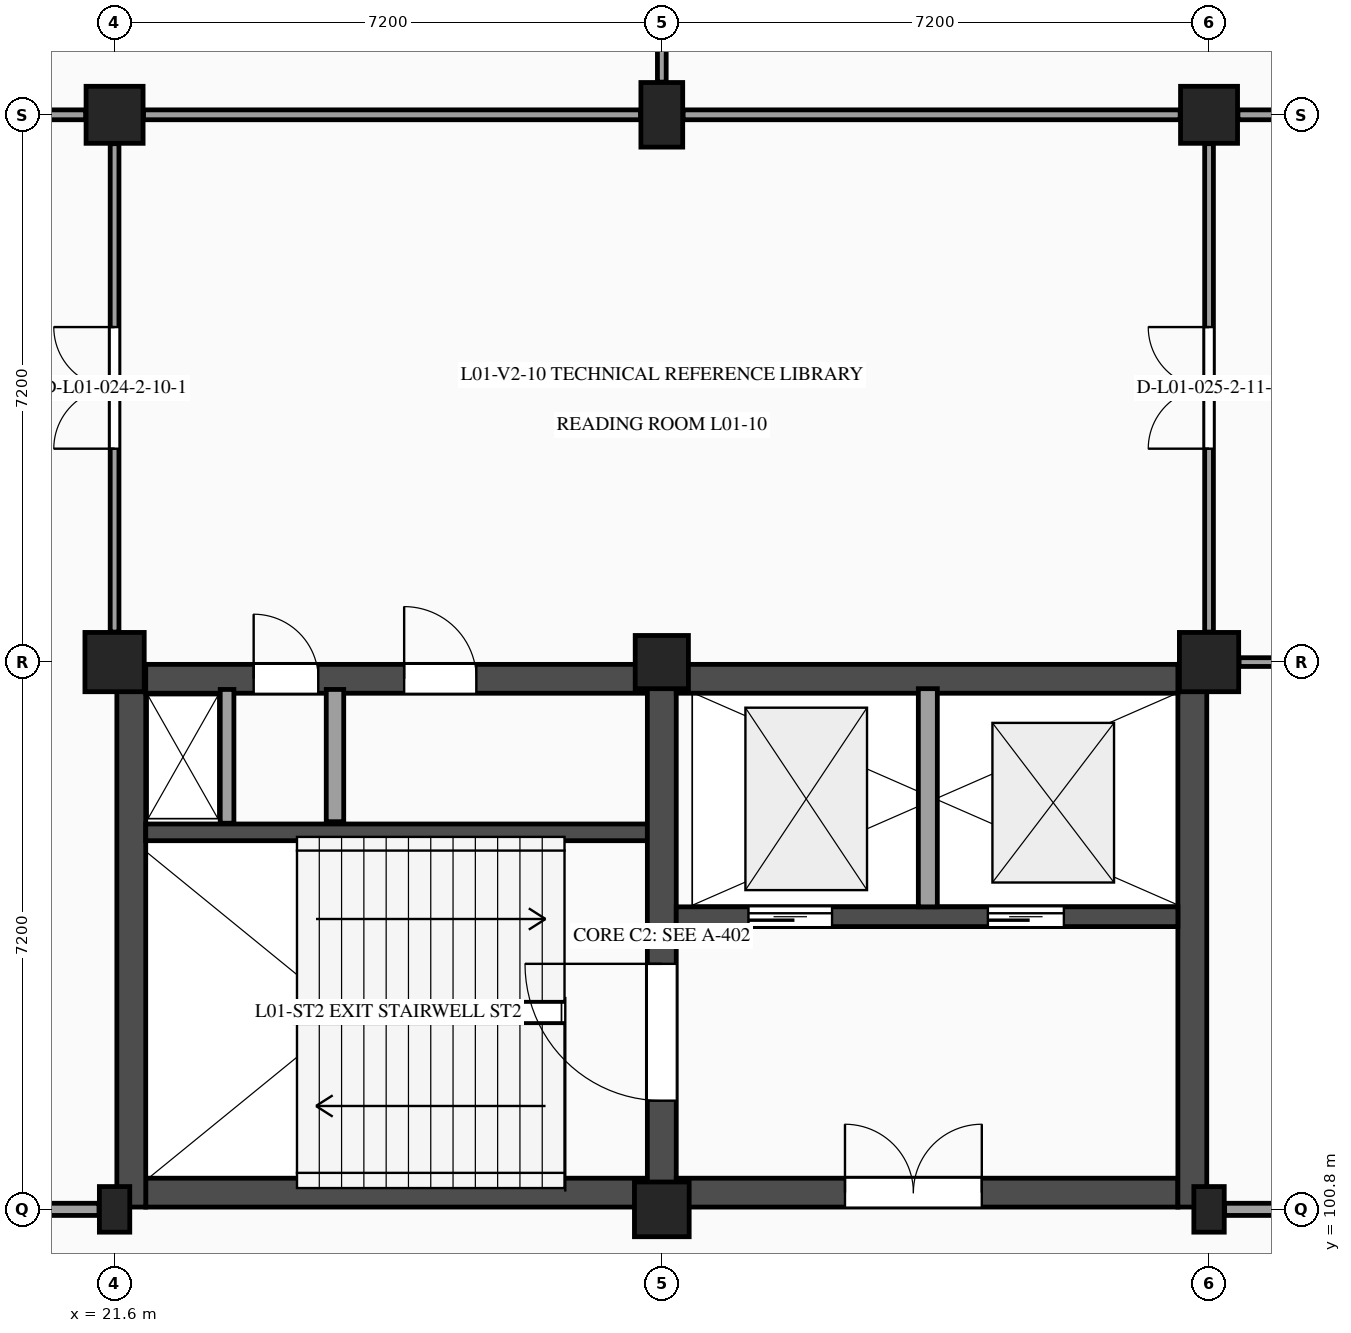
"""IFC4 building model, lengths in metres.
Left out: names, types, materials, properties, quantities, classifications, styles, units other than length and angle.
Written with IfcOpenShell. Run it as: python <this file> out.ifc"""

import sys

from ifc_helpers import new_model, si_unit, direction, frame, frame_2d, origin, origin_2d, place, context, subcontext, project, spatial, rectangle, extrude, element, fill, save


model = new_model("IFC4")
c1 = context("Model", 3, precision=1e-05, world=origin(), true_north=direction((0.0, 1.0)))
c2 = subcontext(c1, "Body", "Model", "MODEL_VIEW")
j1 = project(units=[si_unit("LENGTHUNIT", "METRE"), si_unit("PLANEANGLEUNIT", "RADIAN")], contexts=[c1])
p1 = place(None, origin())
s1 = spatial("IfcSite", under=j1, at=p1, CompositionType="ELEMENT")
p2 = place(p1, origin())
s2 = spatial("IfcBuilding", under=s1, at=p2, CompositionType="ELEMENT")
p3 = place(p2, frame((0.0, 0.0, 5.4)))
s3 = spatial("IfcBuildingStorey", under=s2, at=p3, CompositionType="ELEMENT", Elevation=5.4)
p4 = place(p3, frame((21.6, 100.8, 0.0), z_axis=(0.0, 0.0, 1.0), x_axis=(1.0, 0.0, 0.0)))
e1 = element("IfcColumn", 1, at=p4, inside=s3, PredefinedType="PILASTER", context=c2, shape_type="SweptSolid", body=[
    extrude(rectangle(XDim=0.4, YDim=0.6, at=origin_2d()), origin(), (0.0, 0.0, 1.0), 4.5),
])
p5 = place(p3, frame((21.6, 108.0, 0.0), z_axis=(0.0, 0.0, 1.0), x_axis=(1.0, 0.0, 0.0)))
e2 = element("IfcColumn", 2, at=p5, inside=s3, PredefinedType="COLUMN", context=c2, shape_type="SweptSolid", body=[
    extrude(rectangle(XDim=0.78, YDim=0.78, at=origin_2d()), origin(), (0.0, 0.0, 1.0), 4.5),
])
p6 = place(p3, frame((21.6, 115.2, 0.0), z_axis=(0.0, 0.0, 1.0), x_axis=(1.0, 0.0, 0.0)))
e3 = element("IfcColumn", 3, at=p6, inside=s3, PredefinedType="COLUMN", context=c2, shape_type="SweptSolid", body=[
    extrude(rectangle(XDim=0.75, YDim=0.75, at=origin_2d()), origin(), (0.0, 0.0, 1.0), 4.5),
])
p7 = place(p3, frame((28.8, 100.8, 0.0), z_axis=(0.0, 0.0, 1.0), x_axis=(1.0, 0.0, 0.0)))
e4 = element("IfcColumn", 4, at=p7, inside=s3, PredefinedType="COLUMN", context=c2, shape_type="SweptSolid", body=[
    extrude(rectangle(XDim=0.72, YDim=0.72, at=origin_2d()), origin(), (0.0, 0.0, 1.0), 4.5),
])
p8 = place(p3, frame((28.8, 108.0, 0.0), z_axis=(0.0, 0.0, 1.0), x_axis=(1.0, 0.0, 0.0)))
e5 = element("IfcColumn", 5, at=p8, inside=s3, PredefinedType="COLUMN", context=c2, shape_type="SweptSolid", body=[
    extrude(rectangle(XDim=0.7, YDim=0.7, at=origin_2d()), origin(), (0.0, 0.0, 1.0), 4.5),
])
p9 = place(p3, frame((28.8, 115.2, 0.0), z_axis=(0.0, 0.0, 1.0), x_axis=(1.0, 0.0, 0.0)))
e6 = element("IfcColumn", 6, at=p9, inside=s3, PredefinedType="COLUMN", context=c2, shape_type="SweptSolid", body=[
    extrude(rectangle(XDim=0.55, YDim=0.85, at=origin_2d()), origin(), (0.0, 0.0, 1.0), 4.5),
])
p10 = place(p3, frame((36.0, 100.8, 0.0), z_axis=(0.0, 0.0, 1.0), x_axis=(1.0, 0.0, 0.0)))
e7 = element("IfcColumn", 7, at=p10, inside=s3, PredefinedType="PILASTER", context=c2, shape_type="SweptSolid", body=[
    extrude(rectangle(XDim=0.4, YDim=0.6, at=origin_2d()), origin(), (0.0, 0.0, 1.0), 4.5),
])
p11 = place(p3, frame((36.0, 108.0, 0.0), z_axis=(0.0, 0.0, 1.0), x_axis=(1.0, 0.0, 0.0)))
e8 = element("IfcColumn", 8, at=p11, inside=s3, PredefinedType="COLUMN", context=c2, shape_type="SweptSolid", body=[
    extrude(rectangle(XDim=0.78, YDim=0.78, at=origin_2d()), origin(), (0.0, 0.0, 1.0), 4.5),
])
p12 = place(p3, frame((36.0, 115.2, 0.0), z_axis=(0.0, 0.0, 1.0), x_axis=(1.0, 0.0, 0.0)))
e9 = element("IfcColumn", 9, at=p12, inside=s3, PredefinedType="COLUMN", context=c2, shape_type="SweptSolid", body=[
    extrude(rectangle(XDim=0.75, YDim=0.75, at=origin_2d()), origin(), (0.0, 0.0, 1.0), 4.5),
])
p13 = place(p3, frame((22.01, 101.02, 0.0), z_axis=(0.0, 0.0, 1.0), x_axis=(1.0, 0.0, 0.0)))
e10 = element("IfcWall", 10, at=p13, inside=s3, PredefinedType="SHEAR", context=c2, shape_type="SweptSolid", body=[
    extrude(rectangle(XDim=6.6, YDim=0.38, at=frame_2d((3.3, 0.0))), origin(), (0.0, 0.0, 1.0), 4.21),
])
p14 = place(p3, frame((21.82, 107.97, 0.0), z_axis=(0.0, 0.0, 1.0), x_axis=(0.0, -1.0, 0.0)))
e11 = element("IfcWall", 11, at=p14, inside=s3, PredefinedType="SHEAR", context=c2, shape_type="SweptSolid", body=[
    extrude(rectangle(XDim=7.14, YDim=0.38, at=frame_2d((3.57, 0.0))), origin(), (0.0, 0.0, 1.0), 4.21),
])
p15 = place(p3, frame((22.01, 107.78, 0.0), z_axis=(0.0, 0.0, 1.0), x_axis=(1.0, 0.0, 0.0)))
e12 = element("IfcWall", 12, at=p15, inside=s3, PredefinedType="SHEAR", context=c2, shape_type="SweptSolid", body=[
    extrude(rectangle(XDim=6.6, YDim=0.38, at=frame_2d((3.3, 0.0))), origin(), (0.0, 0.0, 1.0), 4.21),
])
p16 = place(p15, frame((1.42, 0.0, 0.0)))
e13 = element("IfcOpeningElement", 13, at=p16, cuts=e12, PredefinedType="OPENING", context=c2, shape_type="SweptSolid", body=[
    extrude(rectangle(XDim=0.85, YDim=2.1, at=frame_2d((0.425, 1.05))), frame((0.0, 0.2, 0.0), z_axis=(0.0, -1.0, 0.0), x_axis=(1.0, 0.0, 0.0)), (0.0, 0.0, 1.0), 0.4),
])
p17 = place(p15, frame((3.4, 0.0, 0.0)))
e14 = element("IfcOpeningElement", 14, at=p17, cuts=e12, PredefinedType="OPENING", context=c2, shape_type="SweptSolid", body=[
    extrude(rectangle(XDim=0.95, YDim=2.15, at=frame_2d((0.475, 1.075))), frame((0.0, 0.2, 0.0), z_axis=(0.0, -1.0, 0.0), x_axis=(1.0, 0.0, 0.0)), (0.0, 0.0, 1.0), 0.4),
])
p18 = place(p3, frame((22.01, 105.76, 0.0), z_axis=(0.0, 0.0, 1.0), x_axis=(1.0, 0.0, 0.0)))
e15 = element("IfcWall", 15, at=p18, inside=s3, PredefinedType="SHEAR", context=c2, shape_type="SweptSolid", body=[
    extrude(rectangle(XDim=6.6, YDim=0.22, at=frame_2d((3.3, 0.0))), origin(), (0.0, 0.0, 1.0), 4.21),
])
p19 = place(p3, frame((24.5, 105.9, 0.0), z_axis=(0.0, 0.0, 1.0), x_axis=(0.0, 1.0, 0.0)))
e16 = element("IfcWall", 16, at=p19, inside=s3, PredefinedType="PARTITIONING", context=c2, shape_type="SweptSolid", body=[
    extrude(rectangle(XDim=1.74, YDim=0.23, at=frame_2d((0.87, 0.0))), origin(), (0.0, 0.0, 1.0), 4.21),
])
p20 = place(p3, frame((23.08, 105.88, 0.0), z_axis=(0.0, 0.0, 1.0), x_axis=(0.0, 1.0, 0.0)))
e17 = element("IfcWall", 17, at=p20, inside=s3, PredefinedType="PARTITIONING", context=c2, shape_type="SweptSolid", body=[
    extrude(rectangle(XDim=1.76, YDim=0.18, at=frame_2d((0.88, 0.0))), origin(), (0.0, 0.0, 1.0), 4.21),
])
p21 = place(p3, frame((28.8, 100.83, 0.0), z_axis=(0.0, 0.0, 1.0), x_axis=(0.0, 1.0, 0.0)))
e18 = element("IfcWall", 18, at=p21, inside=s3, PredefinedType="SHEAR", context=c2, shape_type="SweptSolid", body=[
    extrude(rectangle(XDim=7.14, YDim=0.38, at=frame_2d((3.57, 0.0))), origin(), (0.0, 0.0, 1.0), 4.21),
])
p22 = place(p21, frame((1.4, 0.0, 0.0)))
e19 = element("IfcOpeningElement", 19, at=p22, cuts=e18, PredefinedType="OPENING", context=c2, shape_type="SweptSolid", body=[
    extrude(rectangle(XDim=1.8, YDim=2.2, at=frame_2d((0.9, 1.1))), frame((0.0, 0.2, 0.0), z_axis=(0.0, -1.0, 0.0), x_axis=(1.0, 0.0, 0.0)), (0.0, 0.0, 1.0), 0.4),
])
p23 = place(p3, frame((28.99, 101.02, 0.0), z_axis=(0.0, 0.0, 1.0), x_axis=(1.0, 0.0, 0.0)))
e20 = element("IfcWall", 20, at=p23, inside=s3, PredefinedType="SHEAR", context=c2, shape_type="SweptSolid", body=[
    extrude(rectangle(XDim=6.6, YDim=0.38, at=frame_2d((3.3, 0.0))), origin(), (0.0, 0.0, 1.0), 4.21),
])
p24 = place(p23, frame((2.22, 0.0, 0.0)))
e21 = element("IfcOpeningElement", 21, at=p24, cuts=e20, PredefinedType="OPENING", context=c2, shape_type="SweptSolid", body=[
    extrude(rectangle(XDim=1.8, YDim=2.2, at=frame_2d((0.9, 1.1))), frame((0.0, 0.2, 0.0), z_axis=(0.0, -1.0, 0.0), x_axis=(1.0, 0.0, 0.0)), (0.0, 0.0, 1.0), 0.4),
])
p25 = place(p3, frame((35.78, 100.83, 0.0), z_axis=(0.0, 0.0, 1.0), x_axis=(0.0, 1.0, 0.0)))
e22 = element("IfcWall", 22, at=p25, inside=s3, PredefinedType="SHEAR", context=c2, shape_type="SweptSolid", body=[
    extrude(rectangle(XDim=7.14, YDim=0.38, at=frame_2d((3.57, 0.0))), origin(), (0.0, 0.0, 1.0), 4.21),
])
p26 = place(p3, frame((28.99, 107.78, 0.0), z_axis=(0.0, 0.0, 1.0), x_axis=(1.0, 0.0, 0.0)))
e23 = element("IfcWall", 23, at=p26, inside=s3, PredefinedType="SHEAR", context=c2, shape_type="SweptSolid", body=[
    extrude(rectangle(XDim=6.6, YDim=0.38, at=frame_2d((3.3, 0.0))), origin(), (0.0, 0.0, 1.0), 4.21),
])
p27 = place(p3, frame((28.99, 104.65, 0.0), z_axis=(0.0, 0.0, 1.0), x_axis=(1.0, 0.0, 0.0)))
e24 = element("IfcWall", 24, at=p27, inside=s3, PredefinedType="SHEAR", context=c2, shape_type="SweptSolid", body=[
    extrude(rectangle(XDim=6.6, YDim=0.26, at=frame_2d((3.3, 0.0))), origin(), (0.0, 0.0, 1.0), 4.21),
])
p28 = place(p27, frame((0.95, 0.0, 0.0)))
e25 = element("IfcOpeningElement", 25, at=p28, cuts=e24, PredefinedType="OPENING", context=c2, shape_type="SweptSolid", body=[
    extrude(rectangle(XDim=1.1, YDim=2.2, at=frame_2d((0.55, 1.1))), frame((0.0, 0.14, 0.0), z_axis=(0.0, -1.0, 0.0), x_axis=(1.0, 0.0, 0.0)), (0.0, 0.0, 1.0), 0.28),
])
p29 = place(p27, frame((4.1, 0.0, 0.0)))
e26 = element("IfcOpeningElement", 26, at=p29, cuts=e24, PredefinedType="OPENING", context=c2, shape_type="SweptSolid", body=[
    extrude(rectangle(XDim=1.0, YDim=2.15, at=frame_2d((0.5, 1.075))), frame((0.0, 0.14, 0.0), z_axis=(0.0, -1.0, 0.0), x_axis=(1.0, 0.0, 0.0)), (0.0, 0.0, 1.0), 0.28),
])
p30 = place(p3, frame((32.3, 104.78, 0.0), z_axis=(0.0, 0.0, 1.0), x_axis=(0.0, 1.0, 0.0)))
e27 = element("IfcWall", 27, at=p30, inside=s3, PredefinedType="PARTITIONING", context=c2, shape_type="SweptSolid", body=[
    extrude(rectangle(XDim=2.87, YDim=0.25, at=frame_2d((1.435, 0.0))), origin(), (0.0, 0.0, 1.0), 4.21),
])
p31 = place(p3, frame((14.765, 100.8, 0.0), z_axis=(0.0, 0.0, 1.0), x_axis=(1.0, 0.0, 0.0)))
e28 = element("IfcWall", 28, at=p31, inside=s3, PredefinedType="PARTITIONING", context=c2, shape_type="SweptSolid", body=[
    extrude(rectangle(XDim=6.63, YDim=0.16, at=frame_2d((3.315, 0.0))), origin(), (0.0, 0.0, 1.0), 3.485),
])
p32 = place(p3, frame((21.6, 108.395, 0.0), z_axis=(0.0, 0.0, 1.0), x_axis=(0.0, 1.0, 0.0)))
e29 = element("IfcWall", 29, at=p32, inside=s3, PredefinedType="PARTITIONING", context=c2, shape_type="SweptSolid", body=[
    extrude(rectangle(XDim=6.425, YDim=0.115, at=frame_2d((3.212, 0.0))), origin(), (0.0, 0.0, 1.0), 3.525),
])
p33 = place(p32, frame((2.413, 0.0, 0.0)))
e30 = element("IfcOpeningElement", 30, at=p33, cuts=e29, PredefinedType="OPENING", context=c2, shape_type="SweptSolid", body=[
    extrude(rectangle(XDim=1.6, YDim=2.2, at=frame_2d((0.8, 1.1))), frame((0.0, 0.067, 0.0), z_axis=(0.0, -1.0, 0.0), x_axis=(1.0, 0.0, 0.0)), (0.0, 0.0, 1.0), 0.135),
])
p34 = place(p3, frame((14.68, 115.2, 0.0), z_axis=(0.0, 0.0, 1.0), x_axis=(1.0, 0.0, 0.0)))
e31 = element("IfcWall", 31, at=p34, inside=s3, PredefinedType="PARTITIONING", context=c2, shape_type="SweptSolid", body=[
    extrude(rectangle(XDim=6.54, YDim=0.13, at=frame_2d((3.27, 0.0))), origin(), (0.0, 0.0, 1.0), 3.485),
])
p35 = place(p3, frame((21.98, 115.2, 0.0), z_axis=(0.0, 0.0, 1.0), x_axis=(1.0, 0.0, 0.0)))
e32 = element("IfcWall", 32, at=p35, inside=s3, PredefinedType="PARTITIONING", context=c2, shape_type="SweptSolid", body=[
    extrude(rectangle(XDim=6.54, YDim=0.13, at=frame_2d((3.27, 0.0))), origin(), (0.0, 0.0, 1.0), 3.49),
])
p36 = place(p3, frame((28.8, 115.63, 0.0), z_axis=(0.0, 0.0, 1.0), x_axis=(0.0, 1.0, 0.0)))
e33 = element("IfcWall", 33, at=p36, inside=s3, PredefinedType="PARTITIONING", context=c2, shape_type="SweptSolid", body=[
    extrude(rectangle(XDim=6.465, YDim=0.115, at=frame_2d((3.232, 0.0))), origin(), (0.0, 0.0, 1.0), 3.52),
])
p37 = place(p36, frame((2.593, 0.0, 0.0)))
e34 = element("IfcOpeningElement", 34, at=p37, cuts=e33, PredefinedType="OPENING", context=c2, shape_type="SweptSolid", body=[
    extrude(rectangle(XDim=1.28, YDim=2.24, at=frame_2d((0.64, 1.12))), frame((0.0, 0.067, 0.0), z_axis=(0.0, -1.0, 0.0), x_axis=(1.0, 0.0, 0.0)), (0.0, 0.0, 1.0), 0.135),
])
p38 = place(p3, frame((36.0, 108.395, 0.0), z_axis=(0.0, 0.0, 1.0), x_axis=(0.0, 1.0, 0.0)))
e35 = element("IfcWall", 35, at=p38, inside=s3, PredefinedType="PARTITIONING", context=c2, shape_type="SweptSolid", body=[
    extrude(rectangle(XDim=6.425, YDim=0.115, at=frame_2d((3.212, 0.0))), origin(), (0.0, 0.0, 1.0), 3.525),
])
p39 = place(p38, frame((2.413, 0.0, 0.0)))
e36 = element("IfcOpeningElement", 36, at=p39, cuts=e35, PredefinedType="OPENING", context=c2, shape_type="SweptSolid", body=[
    extrude(rectangle(XDim=1.6, YDim=2.2, at=frame_2d((0.8, 1.1))), frame((0.0, 0.067, 0.0), z_axis=(0.0, -1.0, 0.0), x_axis=(1.0, 0.0, 0.0)), (0.0, 0.0, 1.0), 0.135),
])
p40 = place(p3, frame((29.08, 115.2, 0.0), z_axis=(0.0, 0.0, 1.0), x_axis=(1.0, 0.0, 0.0)))
e37 = element("IfcWall", 37, at=p40, inside=s3, PredefinedType="PARTITIONING", context=c2, shape_type="SweptSolid", body=[
    extrude(rectangle(XDim=6.54, YDim=0.13, at=frame_2d((3.27, 0.0))), origin(), (0.0, 0.0, 1.0), 3.51),
])
p41 = place(p3, frame((36.205, 100.8, 0.0), z_axis=(0.0, 0.0, 1.0), x_axis=(1.0, 0.0, 0.0)))
e38 = element("IfcWall", 38, at=p41, inside=s3, PredefinedType="PARTITIONING", context=c2, shape_type="SweptSolid", body=[
    extrude(rectangle(XDim=6.63, YDim=0.16, at=frame_2d((3.315, 0.0))), origin(), (0.0, 0.0, 1.0), 3.55),
])
p42 = place(p41, frame((2.515, 0.0, 0.0)))
e39 = element("IfcOpeningElement", 39, at=p42, cuts=e38, PredefinedType="OPENING", context=c2, shape_type="SweptSolid", body=[
    extrude(rectangle(XDim=1.6, YDim=2.2, at=frame_2d((0.8, 1.1))), frame((0.0, 0.09, 0.0), z_axis=(0.0, -1.0, 0.0), x_axis=(1.0, 0.0, 0.0)), (0.0, 0.0, 1.0), 0.18),
])
p43 = place(p3, frame((36.395, 108.0, 0.0), z_axis=(0.0, 0.0, 1.0), x_axis=(1.0, 0.0, 0.0)))
e40 = element("IfcWall", 40, at=p43, inside=s3, PredefinedType="PARTITIONING", context=c2, shape_type="SweptSolid", body=[
    extrude(rectangle(XDim=6.45, YDim=0.115, at=frame_2d((3.225, 0.0))), origin(), (0.0, 0.0, 1.0), 3.55),
])
p44 = place(p3, frame((36.38, 115.2, 0.0), z_axis=(0.0, 0.0, 1.0), x_axis=(1.0, 0.0, 0.0)))
e41 = element("IfcWall", 41, at=p44, inside=s3, PredefinedType="PARTITIONING", context=c2, shape_type="SweptSolid", body=[
    extrude(rectangle(XDim=6.54, YDim=0.13, at=frame_2d((3.27, 0.0))), origin(), (0.0, 0.0, 1.0), 3.55),
])
p45 = place(p16, origin())
e42 = element("IfcDoor", 42, at=p45, inside=s3, OperationType="SINGLE_SWING_LEFT", PredefinedType="DOOR", context=c2, shape_type="SweptSolid", body=[
    extrude(rectangle(XDim=0.85, YDim=2.1, at=frame_2d((0.425, 1.05))), frame((0.0, 0.025, 0.0), z_axis=(0.0, -1.0, 0.0), x_axis=(1.0, 0.0, 0.0)), (0.0, 0.0, 1.0), 0.05),
])
fill(e13, e42)
p46 = place(p22, origin())
e43 = element("IfcDoor", 43, at=p46, inside=s3, OperationType="SINGLE_SWING_RIGHT", PredefinedType="DOOR", context=c2, shape_type="SweptSolid", body=[
    extrude(rectangle(XDim=1.8, YDim=2.2, at=frame_2d((0.9, 1.1))), frame((0.0, 0.025, 0.0), z_axis=(0.0, -1.0, 0.0), x_axis=(1.0, 0.0, 0.0)), (0.0, 0.0, 1.0), 0.05),
])
fill(e19, e43)
p47 = place(p17, origin())
e44 = element("IfcDoor", 44, at=p47, inside=s3, OperationType="SINGLE_SWING_LEFT", PredefinedType="DOOR", context=c2, shape_type="SweptSolid", body=[
    extrude(rectangle(XDim=0.95, YDim=2.15, at=frame_2d((0.475, 1.075))), frame((0.0, 0.025, 0.0), z_axis=(0.0, -1.0, 0.0), x_axis=(1.0, 0.0, 0.0)), (0.0, 0.0, 1.0), 0.05),
])
fill(e14, e44)
p48 = place(p28, origin())
e45 = element("IfcDoor", 45, at=p48, inside=s3, OperationType="SLIDING_TO_LEFT", PredefinedType="DOOR", context=c2, shape_type="SweptSolid", body=[
    extrude(rectangle(XDim=1.1, YDim=2.2, at=frame_2d((0.55, 1.1))), frame((0.0, 0.025, 0.0), z_axis=(0.0, -1.0, 0.0), x_axis=(1.0, 0.0, 0.0)), (0.0, 0.0, 1.0), 0.05),
])
fill(e25, e45)
p49 = place(p29, origin())
e46 = element("IfcDoor", 46, at=p49, inside=s3, OperationType="SLIDING_TO_RIGHT", PredefinedType="DOOR", context=c2, shape_type="SweptSolid", body=[
    extrude(rectangle(XDim=1.0, YDim=2.15, at=frame_2d((0.5, 1.075))), frame((0.0, 0.025, 0.0), z_axis=(0.0, -1.0, 0.0), x_axis=(1.0, 0.0, 0.0)), (0.0, 0.0, 1.0), 0.05),
])
fill(e26, e46)
p50 = place(p24, origin())
e47 = element("IfcDoor", 47, at=p50, inside=s3, OperationType="DOUBLE_DOOR_SINGLE_SWING", PredefinedType="DOOR", context=c2, shape_type="SweptSolid", body=[
    extrude(rectangle(XDim=1.8, YDim=2.2, at=frame_2d((0.9, 1.1))), frame((0.0, 0.025, 0.0), z_axis=(0.0, -1.0, 0.0), x_axis=(1.0, 0.0, 0.0)), (0.0, 0.0, 1.0), 0.05),
])
fill(e21, e47)
p51 = place(p33, origin())
e48 = element("IfcDoor", 48, at=p51, inside=s3, OperationType="DOUBLE_DOOR_SINGLE_SWING", PredefinedType="DOOR", context=c2, shape_type="SweptSolid", body=[
    extrude(rectangle(XDim=1.6, YDim=2.2, at=frame_2d((0.8, 1.1))), frame((0.0, 0.025, 0.0), z_axis=(0.0, -1.0, 0.0), x_axis=(1.0, 0.0, 0.0)), (0.0, 0.0, 1.0), 0.05),
])
fill(e30, e48)
p52 = place(p39, origin())
e49 = element("IfcDoor", 49, at=p52, inside=s3, OperationType="DOUBLE_DOOR_SINGLE_SWING", PredefinedType="DOOR", context=c2, shape_type="SweptSolid", body=[
    extrude(rectangle(XDim=1.6, YDim=2.2, at=frame_2d((0.8, 1.1))), frame((0.0, 0.025, 0.0), z_axis=(0.0, -1.0, 0.0), x_axis=(1.0, 0.0, 0.0)), (0.0, 0.0, 1.0), 0.05),
])
fill(e36, e49)
save(model, sys.argv[1])
